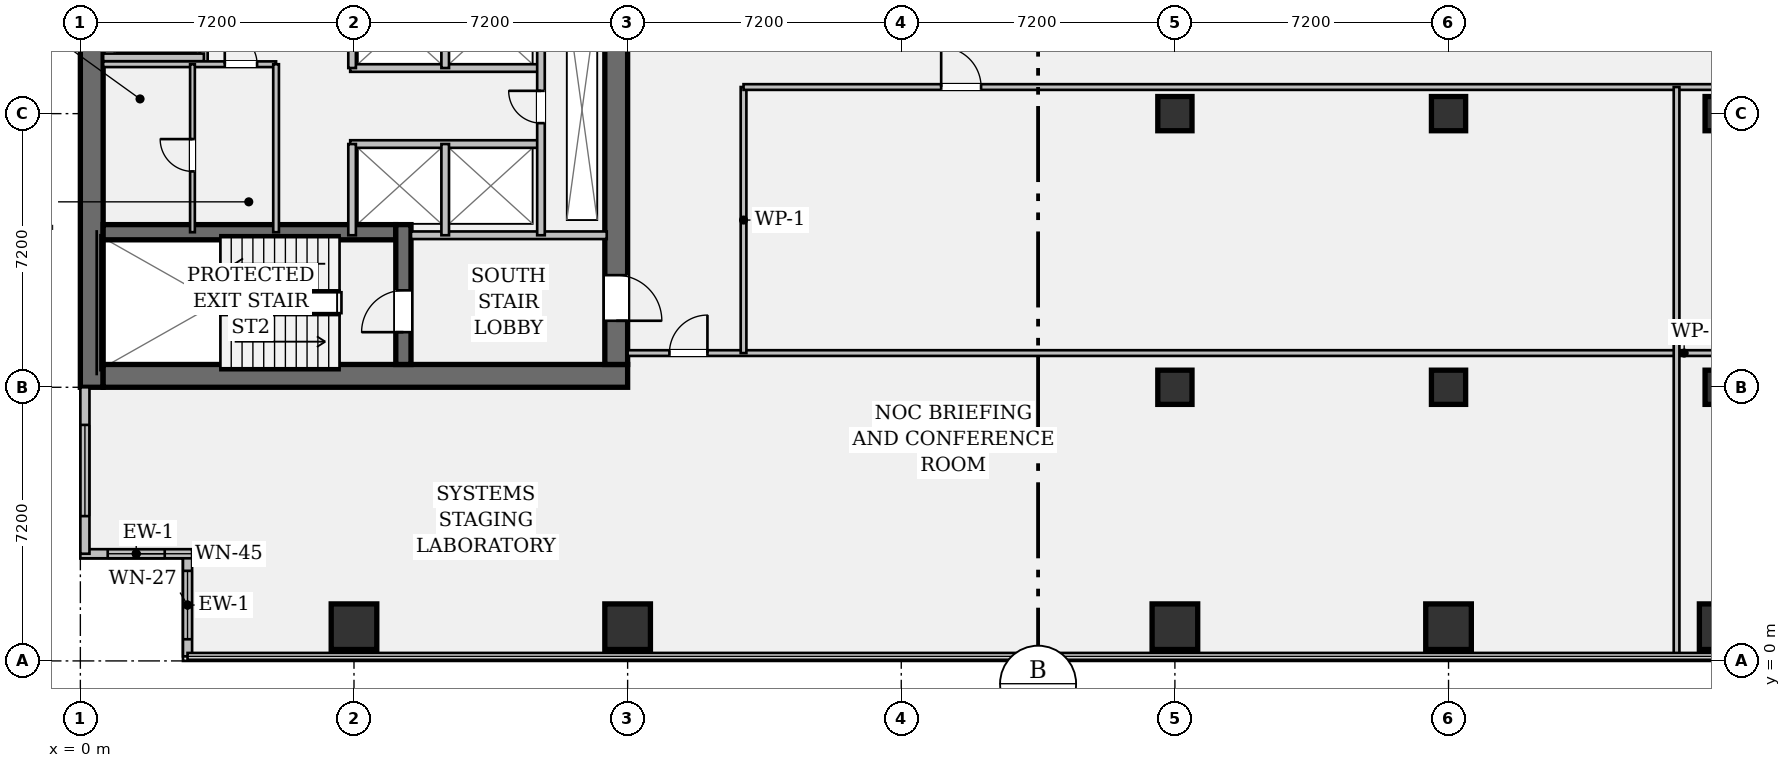
"""IFC4 building model, lengths in metres.
Left out: names, types, materials, properties, quantities, classifications, styles, units other than length and angle.
Written with IfcOpenShell. Run it as: python <this file> out.ifc"""

import sys

from ifc_helpers import new_model, si_unit, direction, frame, frame_2d, origin, origin_2d, place, context, subcontext, project, spatial, rectangle, hollow_rectangle, extrude, element, fill, save


model = new_model("IFC4")
c1 = context("Model", 3, precision=1e-05, world=origin(), true_north=direction((0.0, 1.0)))
c2 = subcontext(c1, "Body", "Model", "MODEL_VIEW")
j1 = project(units=[si_unit("LENGTHUNIT", "METRE"), si_unit("PLANEANGLEUNIT", "RADIAN")], contexts=[c1])
p1 = place(None, origin())
s1 = spatial("IfcSite", under=j1, at=p1, CompositionType="ELEMENT")
p2 = place(p1, origin())
s2 = spatial("IfcBuilding", under=s1, at=p2, CompositionType="ELEMENT")
p3 = place(p2, frame((0.0, 0.0, 9.45)))
s3 = spatial("IfcBuildingStorey", under=s2, at=p3, CompositionType="ELEMENT", Elevation=9.45)
p4 = place(p3, frame((0.3, 7.2, 0.0), z_axis=(0.0, 0.0, 1.0), x_axis=(0.0, 1.0, 0.0)))
e1 = element("IfcWall", 1, at=p4, inside=s3, PredefinedType="SHEAR", context=c2, shape_type="SweptSolid", body=[
    extrude(rectangle(XDim=28.8, YDim=0.6, at=frame_2d((14.4, 0.0))), origin(), (0.0, 0.0, 1.0), 3.9),
])
p5 = place(p3, frame((0.6, 7.5, 0.0), z_axis=(0.0, 0.0, 1.0), x_axis=(1.0, 0.0, 0.0)))
e2 = element("IfcWall", 2, at=p5, inside=s3, PredefinedType="SHEAR", context=c2, shape_type="SweptSolid", body=[
    extrude(rectangle(XDim=13.8, YDim=0.6, at=frame_2d((6.9, 0.0))), origin(), (0.0, 0.0, 1.0), 3.9),
])
p6 = place(p3, frame((14.1, 35.4, 0.0), z_axis=(0.0, 0.0, 1.0), x_axis=(0.0, -1.0, 0.0)))
e3 = element("IfcWall", 3, at=p6, inside=s3, PredefinedType="SHEAR", context=c2, shape_type="SweptSolid", body=[
    extrude(rectangle(XDim=27.6, YDim=0.6, at=frame_2d((13.8, 0.0))), origin(), (0.0, 0.0, 1.0), 3.9),
])
p7 = place(p6, frame((1.3, 0.0, 0.0)))
e4 = element("IfcOpeningElement", 4, at=p7, cuts=e3, PredefinedType="OPENING", context=c2, shape_type="SweptSolid", body=[
    extrude(rectangle(XDim=1.2, YDim=2.15, at=frame_2d((0.6, 1.075))), frame((0.0, 0.312, 0.0), z_axis=(0.0, -1.0, 0.0), x_axis=(1.0, 0.0, 0.0)), (0.0, 0.0, 1.0), 0.624),
])
p8 = place(p6, frame((25.25, 0.0, 0.0)))
e5 = element("IfcOpeningElement", 5, at=p8, cuts=e3, PredefinedType="OPENING", context=c2, shape_type="SweptSolid", body=[
    extrude(rectangle(XDim=1.2, YDim=2.15, at=frame_2d((0.6, 1.075))), frame((0.0, 0.312, 0.0), z_axis=(0.0, -1.0, 0.0), x_axis=(1.0, 0.0, 0.0)), (0.0, 0.0, 1.0), 0.624),
])
p9 = place(p6, frame((14.6, 0.0, 0.0)))
e6 = element("IfcOpeningElement", 6, at=p9, cuts=e3, PredefinedType="OPENING", context=c2, shape_type="SweptSolid", body=[
    extrude(rectangle(XDim=1.6, YDim=2.2, at=frame_2d((0.8, 1.1))), frame((0.0, 0.312, 0.0), z_axis=(0.0, -1.0, 0.0), x_axis=(1.0, 0.0, 0.0)), (0.0, 0.0, 1.0), 0.624),
])
p10 = place(p3, frame((0.6, 11.28, 0.0), z_axis=(0.0, 0.0, 1.0), x_axis=(1.0, 0.0, 0.0)))
e7 = element("IfcWall", 7, at=p10, inside=s3, PredefinedType="SHEAR", context=c2, shape_type="SweptSolid", body=[
    extrude(rectangle(XDim=7.7, YDim=0.4, at=frame_2d((3.85, 0.0))), origin(), (0.0, 0.0, 1.0), 3.9),
])
p11 = place(p3, frame((8.5, 7.8, 0.0), z_axis=(0.0, 0.0, 1.0), x_axis=(0.0, 1.0, 0.0)))
e8 = element("IfcWall", 8, at=p11, inside=s3, PredefinedType="SHEAR", context=c2, shape_type="SweptSolid", body=[
    extrude(rectangle(XDim=3.68, YDim=0.4, at=frame_2d((1.84, 0.0))), origin(), (0.0, 0.0, 1.0), 3.9),
])
p12 = place(p11, frame((0.85, 0.0, 0.0)))
e9 = element("IfcOpeningElement", 9, at=p12, cuts=e8, PredefinedType="OPENING", context=c2, shape_type="SweptSolid", body=[
    extrude(rectangle(XDim=1.1, YDim=2.15, at=frame_2d((0.55, 1.075))), frame((0.0, 0.212, 0.0), z_axis=(0.0, -1.0, 0.0), x_axis=(1.0, 0.0, 0.0)), (0.0, 0.0, 1.0), 0.424),
])
for number, where, z_axis, x_axis in (
    (10, (7.2, 0.9, 0.0), (0.0, 0.0, 1.0), (1.0, 0.0, 0.0)),
    (11, (14.4, 0.9, 0.0), (0.0, 0.0, 1.0), (1.0, 0.0, 0.0)),
    (12, (28.8, 0.9, 0.0), (0.0, 0.0, 1.0), (1.0, 0.0, 0.0)),
):
    element("IfcColumn", number, at=place(p3, frame(where, z_axis=z_axis, x_axis=x_axis)), inside=s3, PredefinedType="COLUMN", context=c2, shape_type="SweptSolid", body=[
        extrude(hollow_rectangle(XDim=1.2, YDim=1.2, WallThickness=0.075, at=origin_2d()), origin(), (0.0, 0.0, 1.0), 3.9),
    ])
for number, where, z_axis, x_axis in (
    (13, (28.8, 7.2, 0.0), (0.0, 0.0, 1.0), (1.0, 0.0, 0.0)),
    (14, (28.8, 14.4, 0.0), (0.0, 0.0, 1.0), (1.0, 0.0, 0.0)),
):
    element("IfcColumn", number, at=place(p3, frame(where, z_axis=z_axis, x_axis=x_axis)), inside=s3, PredefinedType="COLUMN", context=c2, shape_type="SweptSolid", body=[
        extrude(rectangle(XDim=0.9, YDim=0.9, at=origin_2d()), origin(), (0.0, 0.0, 1.0), 3.9),
    ])
p13 = place(p3, frame((36.0, 0.9, 0.0), z_axis=(0.0, 0.0, 1.0), x_axis=(1.0, 0.0, 0.0)))
e15 = element("IfcColumn", 15, at=p13, inside=s3, PredefinedType="COLUMN", context=c2, shape_type="SweptSolid", body=[
    extrude(hollow_rectangle(XDim=1.2, YDim=1.2, WallThickness=0.075, at=origin_2d()), origin(), (0.0, 0.0, 1.0), 3.9),
])
for number, where, z_axis, x_axis in (
    (16, (36.0, 7.2, 0.0), (0.0, 0.0, 1.0), (1.0, 0.0, 0.0)),
    (17, (36.0, 14.4, 0.0), (0.0, 0.0, 1.0), (1.0, 0.0, 0.0)),
):
    element("IfcColumn", number, at=place(p3, frame(where, z_axis=z_axis, x_axis=x_axis)), inside=s3, PredefinedType="COLUMN", context=c2, shape_type="SweptSolid", body=[
        extrude(rectangle(XDim=0.9, YDim=0.9, at=origin_2d()), origin(), (0.0, 0.0, 1.0), 3.9),
    ])
p14 = place(p3, frame((43.2, 0.9, 0.0), z_axis=(0.0, 0.0, 1.0), x_axis=(1.0, 0.0, 0.0)))
e18 = element("IfcColumn", 18, at=p14, inside=s3, PredefinedType="COLUMN", context=c2, shape_type="SweptSolid", body=[
    extrude(hollow_rectangle(XDim=1.2, YDim=1.2, WallThickness=0.075, at=origin_2d()), origin(), (0.0, 0.0, 1.0), 3.9),
])
for number, where, z_axis, x_axis in (
    (19, (43.2, 7.2, 0.0), (0.0, 0.0, 1.0), (1.0, 0.0, 0.0)),
    (20, (43.2, 14.4, 0.0), (0.0, 0.0, 1.0), (1.0, 0.0, 0.0)),
):
    element("IfcColumn", number, at=place(p3, frame(where, z_axis=z_axis, x_axis=x_axis)), inside=s3, PredefinedType="COLUMN", context=c2, shape_type="SweptSolid", body=[
        extrude(rectangle(XDim=0.9, YDim=0.9, at=origin_2d()), origin(), (0.0, 0.0, 1.0), 3.9),
    ])
p15 = place(p3, frame((2.82, 0.12, 0.0), z_axis=(0.0, 0.0, 1.0), x_axis=(0.0, 1.0, 0.0)))
e21 = element("IfcWall", 21, at=p15, inside=s3, PredefinedType="STANDARD", context=c2, shape_type="SweptSolid", body=[
    extrude(rectangle(XDim=2.7, YDim=0.24, at=frame_2d((1.35, 0.0))), origin(), (0.0, 0.0, 1.0), 3.9),
])
p16 = place(p15, frame((0.45, 0.0, 0.95)))
e22 = element("IfcOpeningElement", 22, at=p16, cuts=e21, PredefinedType="OPENING", context=c2, shape_type="SweptSolid", body=[
    extrude(rectangle(XDim=1.8, YDim=1.35, at=frame_2d((0.9, 0.675))), frame((0.0, 0.132, 0.0), z_axis=(0.0, -1.0, 0.0), x_axis=(1.0, 0.0, 0.0)), (0.0, 0.0, 1.0), 0.264),
])
p17 = place(p3, frame((2.94, 2.82, 0.0), z_axis=(0.0, 0.0, 1.0), x_axis=(-1.0, 0.0, 0.0)))
e23 = element("IfcWall", 23, at=p17, inside=s3, PredefinedType="STANDARD", context=c2, shape_type="SweptSolid", body=[
    extrude(rectangle(XDim=2.94, YDim=0.24, at=frame_2d((1.47, 0.0))), origin(), (0.0, 0.0, 1.0), 3.9),
])
p18 = place(p17, frame((0.72, 0.0, 0.95)))
e24 = element("IfcOpeningElement", 24, at=p18, cuts=e23, PredefinedType="OPENING", context=c2, shape_type="SweptSolid", body=[
    extrude(rectangle(XDim=1.5, YDim=1.8, at=frame_2d((0.75, 0.9))), frame((0.0, 0.132, 0.0), z_axis=(0.0, -1.0, 0.0), x_axis=(1.0, 0.0, 0.0)), (0.0, 0.0, 1.0), 0.264),
])
p19 = place(p3, frame((0.12, 2.82, 0.0), z_axis=(0.0, 0.0, 1.0), x_axis=(0.0, 1.0, 0.0)))
e25 = element("IfcWall", 25, at=p19, inside=s3, PredefinedType="STANDARD", context=c2, shape_type="SweptSolid", body=[
    extrude(rectangle(XDim=4.38, YDim=0.24, at=frame_2d((2.19, 0.0))), origin(), (0.0, 0.0, 1.0), 3.9),
])
p20 = place(p19, frame((0.99, 0.0, 0.95)))
e26 = element("IfcOpeningElement", 26, at=p20, cuts=e25, PredefinedType="OPENING", context=c2, shape_type="SweptSolid", body=[
    extrude(rectangle(XDim=2.4, YDim=1.8, at=frame_2d((1.2, 0.9))), frame((0.0, 0.132, 0.0), z_axis=(0.0, -1.0, 0.0), x_axis=(1.0, 0.0, 0.0)), (0.0, 0.0, 1.0), 0.264),
])
p21 = place(p3, frame((8.7, 11.2, 0.0), z_axis=(0.0, 0.0, 1.0), x_axis=(1.0, 0.0, 0.0)))
e27 = element("IfcWall", 27, at=p21, inside=s3, PredefinedType="PARTITIONING", context=c2, shape_type="SweptSolid", body=[
    extrude(rectangle(XDim=5.15, YDim=0.2, at=frame_2d((2.575, 0.0))), origin(), (0.0, 0.0, 1.0), 3.9),
])
p22 = place(p3, frame((3.25, 15.7, 0.0), z_axis=(0.0, 0.0, 1.0), x_axis=(0.0, 1.0, 0.0)))
e28 = element("IfcWall", 28, at=p22, inside=s3, PredefinedType="PARTITIONING", context=c2, shape_type="SweptSolid", body=[
    extrude(rectangle(XDim=13.08, YDim=0.2, at=frame_2d((6.54, 0.0))), origin(), (0.0, 0.0, 1.0), 3.9),
])
p23 = place(p3, frame((0.6, 15.88, 0.0), z_axis=(0.0, 0.0, 1.0), x_axis=(1.0, 0.0, 0.0)))
e29 = element("IfcWall", 29, at=p23, inside=s3, PredefinedType="PARTITIONING", context=c2, shape_type="SweptSolid", body=[
    extrude(rectangle(XDim=2.65, YDim=0.2, at=frame_2d((1.325, 0.0))), origin(), (0.0, 0.0, 1.0), 3.9),
])
for number, where, z_axis, x_axis in (
    (30, (7.1, 15.6, 0.0), (0.0, 0.0, 1.0), (1.0, 0.0, 0.0)),
    (31, (7.1, 13.6, 0.0), (0.0, 0.0, 1.0), (1.0, 0.0, 0.0)),
):
    element("IfcWall", number, at=place(p3, frame(where, z_axis=z_axis, x_axis=x_axis)), inside=s3, PredefinedType="PARTITIONING", context=c2, shape_type="SweptSolid", body=[
        extrude(rectangle(XDim=5.02, YDim=0.2, at=frame_2d((2.51, 0.0))), origin(), (0.0, 0.0, 1.0), 3.9),
    ])
p24 = place(p3, frame((7.15, 15.6, 0.0), z_axis=(0.0, 0.0, 1.0), x_axis=(0.0, 1.0, 0.0)))
e32 = element("IfcWall", 32, at=p24, inside=s3, PredefinedType="PARTITIONING", context=c2, shape_type="SweptSolid", body=[
    extrude(rectangle(XDim=2.2, YDim=0.2, at=frame_2d((1.1, 0.0))), origin(), (0.0, 0.0, 1.0), 3.9),
])
p25 = place(p3, frame((7.15, 11.2, 0.0), z_axis=(0.0, 0.0, 1.0), x_axis=(0.0, 1.0, 0.0)))
e33 = element("IfcWall", 33, at=p25, inside=s3, PredefinedType="PARTITIONING", context=c2, shape_type="SweptSolid", body=[
    extrude(rectangle(XDim=2.4, YDim=0.2, at=frame_2d((1.2, 0.0))), origin(), (0.0, 0.0, 1.0), 3.9),
])
p26 = place(p3, frame((9.6, 15.6, 0.0), z_axis=(0.0, 0.0, 1.0), x_axis=(0.0, 1.0, 0.0)))
e34 = element("IfcWall", 34, at=p26, inside=s3, PredefinedType="PARTITIONING", context=c2, shape_type="SweptSolid", body=[
    extrude(rectangle(XDim=2.2, YDim=0.2, at=frame_2d((1.1, 0.0))), origin(), (0.0, 0.0, 1.0), 3.9),
])
p27 = place(p3, frame((9.6, 11.2, 0.0), z_axis=(0.0, 0.0, 1.0), x_axis=(0.0, 1.0, 0.0)))
e35 = element("IfcWall", 35, at=p27, inside=s3, PredefinedType="PARTITIONING", context=c2, shape_type="SweptSolid", body=[
    extrude(rectangle(XDim=2.4, YDim=0.2, at=frame_2d((1.2, 0.0))), origin(), (0.0, 0.0, 1.0), 3.9),
])
p28 = place(p3, frame((12.12, 11.2, 0.0), z_axis=(0.0, 0.0, 1.0), x_axis=(0.0, 1.0, 0.0)))
e36 = element("IfcWall", 36, at=p28, inside=s3, PredefinedType="PARTITIONING", context=c2, shape_type="SweptSolid", body=[
    extrude(rectangle(XDim=6.6, YDim=0.2, at=frame_2d((3.3, 0.0))), origin(), (0.0, 0.0, 1.0), 3.9),
])
p29 = place(p28, frame((2.95, 0.0, 0.0)))
e37 = element("IfcOpeningElement", 37, at=p29, cuts=e36, PredefinedType="OPENING", context=c2, shape_type="SweptSolid", body=[
    extrude(rectangle(XDim=0.85, YDim=2.15, at=frame_2d((0.425, 1.075))), frame((0.0, 0.112, 0.0), z_axis=(0.0, -1.0, 0.0), x_axis=(1.0, 0.0, 0.0)), (0.0, 0.0, 1.0), 0.224),
])
p30 = place(p3, frame((0.6, 15.7, 0.0), z_axis=(0.0, 0.0, 1.0), x_axis=(1.0, 0.0, 0.0)))
e38 = element("IfcWall", 38, at=p30, inside=s3, PredefinedType="PARTITIONING", context=c2, shape_type="SweptSolid", body=[
    extrude(rectangle(XDim=4.55, YDim=0.15, at=frame_2d((2.275, 0.0))), origin(), (0.0, 0.0, 1.0), 3.9),
])
p31 = place(p30, frame((3.2, 0.0, 0.0)))
e39 = element("IfcOpeningElement", 39, at=p31, cuts=e38, PredefinedType="OPENING", context=c2, shape_type="SweptSolid", body=[
    extrude(rectangle(XDim=0.85, YDim=2.15, at=frame_2d((0.425, 1.075))), frame((0.0, 0.087, 0.0), z_axis=(0.0, -1.0, 0.0), x_axis=(1.0, 0.0, 0.0)), (0.0, 0.0, 1.0), 0.174),
])
p32 = place(p3, frame((5.15, 11.28, 0.0), z_axis=(0.0, 0.0, 1.0), x_axis=(0.0, 1.0, 0.0)))
e40 = element("IfcWall", 40, at=p32, inside=s3, PredefinedType="PARTITIONING", context=c2, shape_type="SweptSolid", body=[
    extrude(rectangle(XDim=4.42, YDim=0.15, at=frame_2d((2.21, 0.0))), origin(), (0.0, 0.0, 1.0), 3.9),
])
p33 = place(p3, frame((2.95, 11.28, 0.0), z_axis=(0.0, 0.0, 1.0), x_axis=(0.0, 1.0, 0.0)))
e41 = element("IfcWall", 41, at=p33, inside=s3, PredefinedType="PARTITIONING", context=c2, shape_type="SweptSolid", body=[
    extrude(rectangle(XDim=4.42, YDim=0.125, at=frame_2d((2.21, 0.0))), origin(), (0.0, 0.0, 1.0), 3.9),
])
p34 = place(p33, frame((1.6, 0.0, 0.0)))
e42 = element("IfcOpeningElement", 42, at=p34, cuts=e41, PredefinedType="OPENING", context=c2, shape_type="SweptSolid", body=[
    extrude(rectangle(XDim=0.85, YDim=2.15, at=frame_2d((0.425, 1.075))), frame((0.0, 0.074, 0.0), z_axis=(0.0, -1.0, 0.0), x_axis=(1.0, 0.0, 0.0)), (0.0, 0.0, 1.0), 0.149),
])
p35 = place(p3, frame((14.4, 8.1, 0.0), z_axis=(0.0, 0.0, 1.0), x_axis=(1.0, 0.0, 0.0)))
e43 = element("IfcWall", 43, at=p35, inside=s3, PredefinedType="PARTITIONING", context=c2, shape_type="SweptSolid", body=[
    extrude(rectangle(XDim=55.6, YDim=0.15, at=frame_2d((27.8, 0.0))), origin(), (0.0, 0.0, 1.0), 2.938),
])
p36 = place(p35, frame((1.1, 0.0, 0.0)))
e44 = element("IfcOpeningElement", 44, at=p36, cuts=e43, PredefinedType="OPENING", context=c2, shape_type="SweptSolid", body=[
    extrude(rectangle(XDim=1.0, YDim=2.15, at=frame_2d((0.5, 1.075))), frame((0.0, 0.087, 0.0), z_axis=(0.0, -1.0, 0.0), x_axis=(1.0, 0.0, 0.0)), (0.0, 0.0, 1.0), 0.174),
])
p37 = place(p3, frame((17.45, 8.1, 0.0), z_axis=(0.0, 0.0, 1.0), x_axis=(0.0, 1.0, 0.0)))
e45 = element("IfcWall", 45, at=p37, inside=s3, PredefinedType="PARTITIONING", context=c2, shape_type="SweptSolid", body=[
    extrude(rectangle(XDim=7.0, YDim=0.15, at=frame_2d((3.5, 0.0))), origin(), (0.0, 0.0, 1.0), 2.938),
])
p38 = place(p3, frame((17.45, 15.1, 0.0), z_axis=(0.0, 0.0, 1.0), x_axis=(1.0, 0.0, 0.0)))
e46 = element("IfcWall", 46, at=p38, inside=s3, PredefinedType="PARTITIONING", context=c2, shape_type="SweptSolid", body=[
    extrude(rectangle(XDim=52.55, YDim=0.15, at=frame_2d((26.275, 0.0))), origin(), (0.0, 0.0, 1.0), 2.938),
])
p39 = place(p38, frame((5.2, 0.0, 0.0)))
e47 = element("IfcOpeningElement", 47, at=p39, cuts=e46, PredefinedType="OPENING", context=c2, shape_type="SweptSolid", body=[
    extrude(rectangle(XDim=1.05, YDim=2.15, at=frame_2d((0.525, 1.075))), frame((0.0, 0.087, 0.0), z_axis=(0.0, -1.0, 0.0), x_axis=(1.0, 0.0, 0.0)), (0.0, 0.0, 1.0), 0.174),
])
p40 = place(p38, frame((27.6, 0.0, 0.0)))
e48 = element("IfcOpeningElement", 48, at=p40, cuts=e46, PredefinedType="OPENING", context=c2, shape_type="SweptSolid", body=[
    extrude(rectangle(XDim=1.05, YDim=2.15, at=frame_2d((0.525, 1.075))), frame((0.0, 0.087, 0.0), z_axis=(0.0, -1.0, 0.0), x_axis=(1.0, 0.0, 0.0)), (0.0, 0.0, 1.0), 0.174),
])
p41 = place(p3, frame((42.0, 0.12, 0.0), z_axis=(0.0, 0.0, 1.0), x_axis=(0.0, 1.0, 0.0)))
e49 = element("IfcWall", 49, at=p41, inside=s3, PredefinedType="PARTITIONING", context=c2, shape_type="SweptSolid", body=[
    extrude(rectangle(XDim=14.98, YDim=0.15, at=frame_2d((7.49, 0.0))), origin(), (0.0, 0.0, 1.0), 2.938),
])
p42 = place(p16, origin())
e50 = element("IfcWindow", 50, at=p42, inside=s3, PartitioningType="SINGLE_PANEL", PredefinedType="WINDOW", context=c2, shape_type="SweptSolid", body=[
    extrude(rectangle(XDim=1.8, YDim=1.35, at=frame_2d((0.9, 0.675))), frame((0.0, 0.03, 0.0), z_axis=(0.0, -1.0, 0.0), x_axis=(1.0, 0.0, 0.0)), (0.0, 0.0, 1.0), 0.06),
])
fill(e22, e50)
p43 = place(p18, origin())
e51 = element("IfcWindow", 51, at=p43, inside=s3, PartitioningType="SINGLE_PANEL", PredefinedType="WINDOW", context=c2, shape_type="SweptSolid", body=[
    extrude(rectangle(XDim=1.5, YDim=1.8, at=frame_2d((0.75, 0.9))), frame((0.0, 0.03, 0.0), z_axis=(0.0, -1.0, 0.0), x_axis=(1.0, 0.0, 0.0)), (0.0, 0.0, 1.0), 0.06),
])
fill(e24, e51)
p44 = place(p20, origin())
e52 = element("IfcWindow", 52, at=p44, inside=s3, PartitioningType="SINGLE_PANEL", PredefinedType="WINDOW", context=c2, shape_type="SweptSolid", body=[
    extrude(rectangle(XDim=2.4, YDim=1.8, at=frame_2d((1.2, 0.9))), frame((0.0, 0.03, 0.0), z_axis=(0.0, -1.0, 0.0), x_axis=(1.0, 0.0, 0.0)), (0.0, 0.0, 1.0), 0.06),
])
fill(e26, e52)
p45 = place(p12, origin())
e53 = element("IfcDoor", 53, at=p45, inside=s3, OperationType="SINGLE_SWING_LEFT", PredefinedType="DOOR", context=c2, shape_type="SweptSolid", body=[
    extrude(rectangle(XDim=1.1, YDim=2.15, at=frame_2d((0.55, 1.075))), frame((0.0, 0.025, 0.0), z_axis=(0.0, -1.0, 0.0), x_axis=(1.0, 0.0, 0.0)), (0.0, 0.0, 1.0), 0.05),
])
fill(e9, e53)
p46 = place(p8, origin())
e54 = element("IfcDoor", 54, at=p46, inside=s3, OperationType="SINGLE_SWING_RIGHT", PredefinedType="DOOR", context=c2, shape_type="SweptSolid", body=[
    extrude(rectangle(XDim=1.2, YDim=2.15, at=frame_2d((0.6, 1.075))), frame((0.0, 0.025, 0.0), z_axis=(0.0, -1.0, 0.0), x_axis=(1.0, 0.0, 0.0)), (0.0, 0.0, 1.0), 0.05),
])
fill(e5, e54)
p47 = place(p29, origin())
e55 = element("IfcDoor", 55, at=p47, inside=s3, OperationType="SINGLE_SWING_RIGHT", PredefinedType="DOOR", context=c2, shape_type="SweptSolid", body=[
    extrude(rectangle(XDim=0.85, YDim=2.15, at=frame_2d((0.425, 1.075))), frame((0.0, 0.025, 0.0), z_axis=(0.0, -1.0, 0.0), x_axis=(1.0, 0.0, 0.0)), (0.0, 0.0, 1.0), 0.05),
])
fill(e37, e55)
p48 = place(p31, origin())
e56 = element("IfcDoor", 56, at=p48, inside=s3, OperationType="SINGLE_SWING_LEFT", PredefinedType="DOOR", context=c2, shape_type="SweptSolid", body=[
    extrude(rectangle(XDim=0.85, YDim=2.15, at=frame_2d((0.425, 1.075))), frame((0.0, 0.025, 0.0), z_axis=(0.0, -1.0, 0.0), x_axis=(1.0, 0.0, 0.0)), (0.0, 0.0, 1.0), 0.05),
])
fill(e39, e56)
p49 = place(p34, origin())
e57 = element("IfcDoor", 57, at=p49, inside=s3, OperationType="SINGLE_SWING_RIGHT", PredefinedType="DOOR", context=c2, shape_type="SweptSolid", body=[
    extrude(rectangle(XDim=0.85, YDim=2.15, at=frame_2d((0.425, 1.075))), frame((0.0, 0.025, 0.0), z_axis=(0.0, -1.0, 0.0), x_axis=(1.0, 0.0, 0.0)), (0.0, 0.0, 1.0), 0.05),
])
fill(e42, e57)
p50 = place(p36, origin())
e58 = element("IfcDoor", 58, at=p50, inside=s3, OperationType="SINGLE_SWING_RIGHT", PredefinedType="DOOR", context=c2, shape_type="SweptSolid", body=[
    extrude(rectangle(XDim=1.0, YDim=2.15, at=frame_2d((0.5, 1.075))), frame((0.0, 0.025, 0.0), z_axis=(0.0, -1.0, 0.0), x_axis=(1.0, 0.0, 0.0)), (0.0, 0.0, 1.0), 0.05),
])
fill(e44, e58)
p51 = place(p39, origin())
e59 = element("IfcDoor", 59, at=p51, inside=s3, OperationType="SINGLE_SWING_LEFT", PredefinedType="DOOR", context=c2, shape_type="SweptSolid", body=[
    extrude(rectangle(XDim=1.05, YDim=2.15, at=frame_2d((0.525, 1.075))), frame((0.0, 0.025, 0.0), z_axis=(0.0, -1.0, 0.0), x_axis=(1.0, 0.0, 0.0)), (0.0, 0.0, 1.0), 0.05),
])
fill(e47, e59)
save(model, sys.argv[1])
